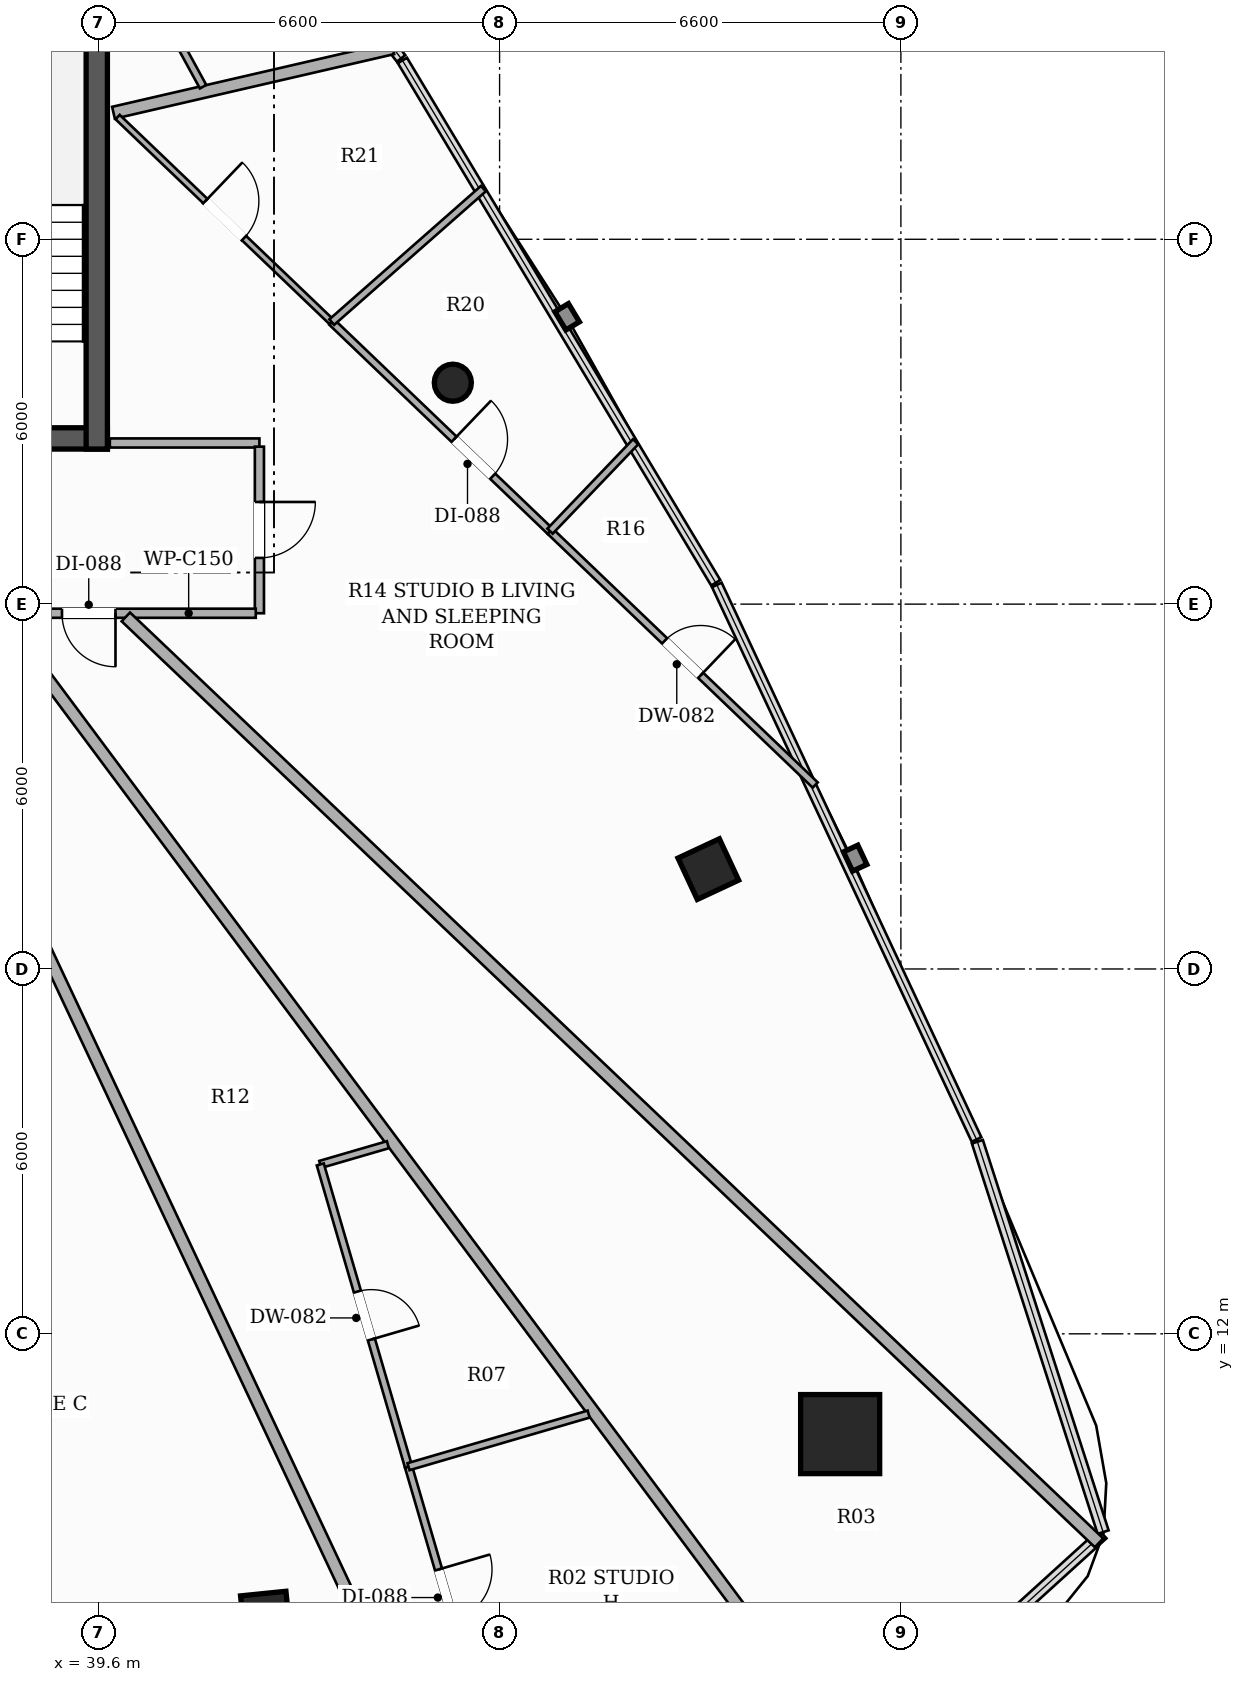
"""IFC4 building model, lengths in metres.
Left out: names, types, materials, properties, quantities, classifications, styles, units other than length and angle.
Written with IfcOpenShell. Run it as: python <this file> out.ifc"""

import sys

from ifc_helpers import new_model, si_unit, direction, frame, frame_2d, origin, origin_2d, place, context, subcontext, project, spatial, rectangle, hollow_rectangle, hollow_circle, extrude, element, fill, save


model = new_model("IFC4")
c1 = context("Model", 3, precision=1e-05, world=origin(), true_north=direction((0.0, 1.0)))
c2 = subcontext(c1, "Body", "Model", "MODEL_VIEW")
j1 = project(units=[si_unit("LENGTHUNIT", "METRE"), si_unit("PLANEANGLEUNIT", "RADIAN")], contexts=[c1])
p1 = place(None, origin())
s1 = spatial("IfcSite", under=j1, at=p1, CompositionType="ELEMENT")
p2 = place(p1, origin())
s2 = spatial("IfcBuilding", under=s1, at=p2, CompositionType="ELEMENT")
p3 = place(p2, frame((0.0, 0.0, 216.2)))
s3 = spatial("IfcBuildingStorey", under=s2, at=p3, CompositionType="ELEMENT", Elevation=216.2)
p4 = place(p3, frame((26.25, 26.725, 0.0), z_axis=(0.0, 0.0, 1.0), x_axis=(1.0, 0.0, 0.0)))
e1 = element("IfcWall", 1, at=p4, inside=s3, PredefinedType="SHEAR", context=c2, shape_type="SweptSolid", body=[
    extrude(rectangle(XDim=13.5, YDim=0.35, at=frame_2d((6.75, 0.0))), origin(), (0.0, 0.0, 1.0), 3.3),
])
p5 = place(p4, frame((4.35, 0.0, 0.0)))
e2 = element("IfcOpeningElement", 2, at=p5, cuts=e1, PredefinedType="OPENING", context=c2, shape_type="SweptSolid", body=[
    extrude(rectangle(XDim=1.05, YDim=2.15, at=frame_2d((0.525, 1.075))), frame((0.0, 0.185, 0.0), z_axis=(0.0, -1.0, 0.0), x_axis=(1.0, 0.0, 0.0)), (0.0, 0.0, 1.0), 0.37),
])
p6 = place(p4, frame((8.3, 0.0, 0.0)))
e3 = element("IfcOpeningElement", 3, at=p6, cuts=e1, PredefinedType="OPENING", context=c2, shape_type="SweptSolid", body=[
    extrude(rectangle(XDim=1.05, YDim=2.15, at=frame_2d((0.525, 1.075))), frame((0.0, 0.185, 0.0), z_axis=(0.0, -1.0, 0.0), x_axis=(1.0, 0.0, 0.0)), (0.0, 0.0, 1.0), 0.37),
])
p7 = place(p3, frame((39.575, 26.55, 0.0), z_axis=(0.0, 0.0, 1.0), x_axis=(0.0, 1.0, 0.0)))
e4 = element("IfcWall", 4, at=p7, inside=s3, PredefinedType="SHEAR", context=c2, shape_type="SweptSolid", body=[
    extrude(rectangle(XDim=7.5, YDim=0.35, at=frame_2d((3.75, 0.0))), origin(), (0.0, 0.0, 1.0), 3.3),
])
p8 = place(p3, frame((51.801, 10.351, 0.0), z_axis=(0.0, 0.0, 1.0), x_axis=(1.0, 0.0, 0.0)))
e5 = element("IfcColumn", 5, at=p8, inside=s3, PredefinedType="COLUMN", context=c2, shape_type="SweptSolid", body=[
    extrude(hollow_rectangle(XDim=1.3, YDim=1.3, WallThickness=0.04, at=origin_2d()), origin(), (0.0, 0.0, 1.0), 3.3),
])
for number, where, z_axis, x_axis in (
    (6, (42.351, 7.355, 0.0), (0.0, 0.0, 1.0), (0.995, 0.101, 0.0)),
    (7, (49.633, 19.642, 0.0), (0.0, 0.0, 1.0), (-0.423, 0.906, 0.0)),
):
    element("IfcColumn", number, at=place(p3, frame(where, z_axis=z_axis, x_axis=x_axis)), inside=s3, PredefinedType="COLUMN", context=c2, shape_type="SweptSolid", body=[
        extrude(hollow_rectangle(XDim=0.75, YDim=0.75, WallThickness=0.025, at=origin_2d()), origin(), (0.0, 0.0, 1.0), 3.3),
    ])
p9 = place(p3, frame((45.431, 27.641, 0.0), z_axis=(0.0, 0.0, 1.0), x_axis=(1.0, 0.0, 0.0)))
e8 = element("IfcColumn", 8, at=p9, inside=s3, PredefinedType="COLUMN", context=c2, shape_type="SweptSolid", body=[
    extrude(hollow_circle(Radius=0.305, WallThickness=0.016, at=origin_2d()), origin(), (0.0, 0.0, 1.0), 3.3),
])
p10 = place(p3, frame((39.79, 26.65, 0.0), z_axis=(0.0, 0.0, 1.0), x_axis=(1.0, 0.0, 0.0)))
e9 = element("IfcWall", 9, at=p10, inside=s3, PredefinedType="PARTITIONING", context=c2, shape_type="SweptSolid", body=[
    extrude(rectangle(XDim=2.46, YDim=0.15, at=frame_2d((1.23, 0.0))), origin(), (0.0, 0.0, 1.0), 2.565),
])
p11 = place(p3, frame((42.25, 26.59, 0.0), z_axis=(0.0, 0.0, 1.0), x_axis=(0.0, -1.0, 0.0)))
e10 = element("IfcWall", 10, at=p11, inside=s3, PredefinedType="PARTITIONING", context=c2, shape_type="SweptSolid", body=[
    extrude(rectangle(XDim=2.74, YDim=0.15, at=frame_2d((1.37, 0.0))), origin(), (0.0, 0.0, 1.0), 2.773),
])
p12 = place(p11, frame((0.91, 0.0, 0.0)))
e11 = element("IfcOpeningElement", 11, at=p12, cuts=e10, PredefinedType="OPENING", context=c2, shape_type="SweptSolid", body=[
    extrude(rectangle(XDim=0.92, YDim=2.15, at=frame_2d((0.46, 1.075))), frame((0.0, 0.085, 0.0), z_axis=(0.0, -1.0, 0.0), x_axis=(1.0, 0.0, 0.0)), (0.0, 0.0, 1.0), 0.17),
])
p13 = place(p3, frame((42.19, 23.85, 0.0), z_axis=(0.0, 0.0, 1.0), x_axis=(-1.0, 0.0, 0.0)))
e12 = element("IfcWall", 12, at=p13, inside=s3, PredefinedType="PARTITIONING", context=c2, shape_type="SweptSolid", body=[
    extrude(rectangle(XDim=8.263, YDim=0.15, at=frame_2d((4.131, 0.0))), origin(), (0.0, 0.0, 1.0), 2.565),
])
p14 = place(p13, frame((6.516, 0.0, 0.0)))
e13 = element("IfcOpeningElement", 13, at=p14, cuts=e12, PredefinedType="OPENING", context=c2, shape_type="SweptSolid", body=[
    extrude(rectangle(XDim=0.88, YDim=2.1, at=frame_2d((0.44, 1.05))), frame((0.0, 0.085, 0.0), z_axis=(0.0, -1.0, 0.0), x_axis=(1.0, 0.0, 0.0)), (0.0, 0.0, 1.0), 0.17),
])
p15 = place(p13, frame((2.307, 0.0, 0.0)))
e14 = element("IfcOpeningElement", 14, at=p15, cuts=e12, PredefinedType="OPENING", context=c2, shape_type="SweptSolid", body=[
    extrude(rectangle(XDim=0.88, YDim=2.1, at=frame_2d((0.44, 1.05))), frame((0.0, 0.085, 0.0), z_axis=(0.0, -1.0, 0.0), x_axis=(1.0, 0.0, 0.0)), (0.0, 0.0, 1.0), 0.17),
])
p16 = place(p13, frame((4.384, 0.0, 0.0)))
e15 = element("IfcOpeningElement", 15, at=p16, cuts=e12, PredefinedType="OPENING", context=c2, shape_type="SweptSolid", body=[
    extrude(rectangle(XDim=0.92, YDim=2.15, at=frame_2d((0.46, 1.075))), frame((0.0, 0.085, 0.0), z_axis=(0.0, -1.0, 0.0), x_axis=(1.0, 0.0, 0.0)), (0.0, 0.0, 1.0), 0.17),
])
p17 = place(p3, frame((39.85, 32.081, 0.0), z_axis=(0.0, 0.0, 1.0), x_axis=(0.974339670333, 0.225082666628, 0.0)))
e16 = element("IfcWall", 16, at=p17, inside=s3, PredefinedType="PARTITIONING", context=c2, shape_type="SweptSolid", body=[
    extrude(rectangle(XDim=4.714, YDim=0.2, at=frame_2d((2.357, 0.0))), origin(), (0.0, 0.0, 1.0), 2.492),
])
p18 = place(p3, frame((56.059, 8.563, 0.0), z_axis=(0.0, 0.0, 1.0), x_axis=(-0.724518891706, 0.689254942355, 0.0)))
e17 = element("IfcWall", 17, at=p18, inside=s3, PredefinedType="PARTITIONING", context=c2, shape_type="SweptSolid", body=[
    extrude(rectangle(XDim=22.092, YDim=0.2, at=frame_2d((11.046, 0.0))), origin(), (0.0, 0.0, 1.0), 2.492),
])
p19 = place(p3, frame((36.155, 23.79, 0.0), z_axis=(0.0, 0.0, 1.0), x_axis=(0.425451226132, -0.90498135571, 0.0)))
e18 = element("IfcWall", 18, at=p19, inside=s3, PredefinedType="PARTITIONING", context=c2, shape_type="SweptSolid", body=[
    extrude(rectangle(XDim=20.266, YDim=0.2, at=frame_2d((10.133, 0.0))), origin(), (0.0, 0.0, 1.0), 2.492),
])
p20 = place(p3, frame((51.072, 6.251, 0.0), z_axis=(0.0, 0.0, 1.0), x_axis=(-0.59756139073, 0.801823162742, 0.0)))
e19 = element("IfcWall", 19, at=p20, inside=s3, PredefinedType="PARTITIONING", context=c2, shape_type="SweptSolid", body=[
    extrude(rectangle(XDim=21.874, YDim=0.2, at=frame_2d((10.937, 0.0))), origin(), (0.0, 0.0, 1.0), 2.492),
])
p21 = place(p3, frame((47.03, 25.2, 0.0), z_axis=(0.0, 0.0, 1.0), x_axis=(0.722345830301, -0.691531995968, 0.0)))
e20 = element("IfcWall", 20, at=p21, inside=s3, PredefinedType="PARTITIONING", context=c2, shape_type="SweptSolid", body=[
    extrude(rectangle(XDim=6.037, YDim=0.12, at=frame_2d((3.019, 0.0))), origin(), (0.0, 0.0, 1.0), 2.492),
])
p22 = place(p21, frame((2.609, 0.0, 0.0)))
e21 = element("IfcOpeningElement", 21, at=p22, cuts=e20, PredefinedType="OPENING", context=c2, shape_type="SweptSolid", body=[
    extrude(rectangle(XDim=0.82, YDim=2.1, at=frame_2d((0.41, 1.05))), frame((0.0, 0.07, 0.0), z_axis=(0.0, -1.0, 0.0), x_axis=(1.0, 0.0, 0.0)), (0.0, 0.0, 1.0), 0.14),
])
p23 = place(p3, frame((43.44, 28.638, 0.0), z_axis=(0.0, 0.0, 1.0), x_axis=(0.722240667523, -0.691641827954, 0.0)))
e22 = element("IfcWall", 22, at=p23, inside=s3, PredefinedType="PARTITIONING", context=c2, shape_type="SweptSolid", body=[
    extrude(rectangle(XDim=4.971, YDim=0.12, at=frame_2d((2.485, 0.0))), origin(), (0.0, 0.0, 1.0), 2.492),
])
p24 = place(p23, frame((2.785, 0.0, 0.0)))
e23 = element("IfcOpeningElement", 23, at=p24, cuts=e22, PredefinedType="OPENING", context=c2, shape_type="SweptSolid", body=[
    extrude(rectangle(XDim=0.88, YDim=2.1, at=frame_2d((0.44, 1.05))), frame((0.0, 0.07, 0.0), z_axis=(0.0, -1.0, 0.0), x_axis=(1.0, 0.0, 0.0)), (0.0, 0.0, 1.0), 0.14),
])
p25 = place(p3, frame((39.918, 32.01, 0.0), z_axis=(0.0, 0.0, 1.0), x_axis=(0.722311203135, -0.691568164266, 0.0)))
e24 = element("IfcWall", 24, at=p25, inside=s3, PredefinedType="PARTITIONING", context=c2, shape_type="SweptSolid", body=[
    extrude(rectangle(XDim=4.876, YDim=0.1, at=frame_2d((2.438, 0.0))), origin(), (0.0, 0.0, 1.0), 2.773),
])
p26 = place(p25, frame((1.998, 0.0, 0.0)))
e25 = element("IfcOpeningElement", 25, at=p26, cuts=e24, PredefinedType="OPENING", context=c2, shape_type="SweptSolid", body=[
    extrude(rectangle(XDim=0.88, YDim=2.1, at=frame_2d((0.44, 1.05))), frame((0.0, 0.06, 0.0), z_axis=(0.0, -1.0, 0.0), x_axis=(1.0, 0.0, 0.0)), (0.0, 0.0, 1.0), 0.12),
])
p27 = place(p3, frame((47.03, 25.2, 0.0), z_axis=(0.0, 0.0, 1.0), x_axis=(0.691459612883, 0.722415118717, 0.0)))
e26 = element("IfcWall", 26, at=p27, inside=s3, PredefinedType="PARTITIONING", context=c2, shape_type="SweptSolid", body=[
    extrude(rectangle(XDim=2.035, YDim=0.12, at=frame_2d((1.018, 0.0))), origin(), (0.0, 0.0, 1.0), 2.492),
])
p28 = place(p3, frame((43.44, 28.638, 0.0), z_axis=(0.0, 0.0, 1.0), x_axis=(0.750679989093, 0.66066599275, 0.0)))
e27 = element("IfcWall", 27, at=p28, inside=s3, PredefinedType="PARTITIONING", context=c2, shape_type="SweptSolid", body=[
    extrude(rectangle(XDim=3.323, YDim=0.12, at=frame_2d((1.661, 0.0))), origin(), (0.0, 0.0, 1.0), 2.492),
])
p29 = place(p3, frame((38.357, 37.934, 0.0), z_axis=(0.0, 0.0, 1.0), x_axis=(0.479839410825, -0.877356335715, 0.0)))
e28 = element("IfcWall", 28, at=p29, inside=s3, PredefinedType="PARTITIONING", context=c2, shape_type="SweptSolid", body=[
    extrude(rectangle(XDim=6.183, YDim=0.12, at=frame_2d((3.092, 0.0))), origin(), (0.0, 0.0, 1.0), 2.492),
])
p30 = place(p3, frame((44.363, 15.11, 0.0), z_axis=(0.0, 0.0, 1.0), x_axis=(-0.960030681494, -0.279894784857, 0.0)))
e29 = element("IfcWall", 29, at=p30, inside=s3, PredefinedType="PARTITIONING", context=c2, shape_type="SweptSolid", body=[
    extrude(rectangle(XDim=1.158, YDim=0.12, at=frame_2d((0.579, 0.0))), origin(), (0.0, 0.0, 1.0), 2.773),
])
p31 = place(p3, frame((43.251, 14.786, 0.0), z_axis=(0.0, 0.0, 1.0), x_axis=(0.280190088139, -0.959944537204, 0.0)))
e30 = element("IfcWall", 30, at=p31, inside=s3, PredefinedType="PARTITIONING", context=c2, shape_type="SweptSolid", body=[
    extrude(rectangle(XDim=5.178, YDim=0.12, at=frame_2d((2.589, 0.0))), origin(), (0.0, 0.0, 1.0), 3.06),
])
p32 = place(p31, frame((2.179, 0.0, 0.0)))
e31 = element("IfcOpeningElement", 31, at=p32, cuts=e30, PredefinedType="OPENING", context=c2, shape_type="SweptSolid", body=[
    extrude(rectangle(XDim=0.82, YDim=2.1, at=frame_2d((0.41, 1.05))), frame((0.0, 0.07, 0.0), z_axis=(0.0, -1.0, 0.0), x_axis=(1.0, 0.0, 0.0)), (0.0, 0.0, 1.0), 0.14),
])
p33 = place(p3, frame((44.702, 9.815, 0.0), z_axis=(0.0, 0.0, 1.0), x_axis=(0.28033432121, -0.959902426474, 0.0)))
e32 = element("IfcWall", 32, at=p33, inside=s3, PredefinedType="PARTITIONING", context=c2, shape_type="SweptSolid", body=[
    extrude(rectangle(XDim=4.402, YDim=0.12, at=frame_2d((2.201, 0.0))), origin(), (0.0, 0.0, 1.0), 2.492),
])
p34 = place(p33, frame((1.761, 0.0, 0.0)))
e33 = element("IfcOpeningElement", 33, at=p34, cuts=e32, PredefinedType="OPENING", context=c2, shape_type="SweptSolid", body=[
    extrude(rectangle(XDim=0.88, YDim=2.1, at=frame_2d((0.44, 1.05))), frame((0.0, 0.07, 0.0), z_axis=(0.0, -1.0, 0.0), x_axis=(1.0, 0.0, 0.0)), (0.0, 0.0, 1.0), 0.14),
])
p35 = place(p3, frame((47.665, 10.68, 0.0), z_axis=(0.0, 0.0, 1.0), x_axis=(-0.959935309068, -0.280221702235, 0.0)))
e34 = element("IfcWall", 34, at=p35, inside=s3, PredefinedType="PARTITIONING", context=c2, shape_type="SweptSolid", body=[
    extrude(rectangle(XDim=3.087, YDim=0.12, at=frame_2d((1.543, 0.0))), origin(), (0.0, 0.0, 1.0), 2.773),
])
p36 = place(p12, origin())
e35 = element("IfcDoor", 35, at=p36, inside=s3, OperationType="SINGLE_SWING_LEFT", PredefinedType="DOOR", context=c2, shape_type="SweptSolid", body=[
    extrude(rectangle(XDim=0.92, YDim=2.15, at=frame_2d((0.46, 1.075))), frame((0.0, 0.025, 0.0), z_axis=(0.0, -1.0, 0.0), x_axis=(1.0, 0.0, 0.0)), (0.0, 0.0, 1.0), 0.05),
])
fill(e11, e35)
p37 = place(p22, origin())
e36 = element("IfcDoor", 36, at=p37, inside=s3, OperationType="SINGLE_SWING_RIGHT", PredefinedType="DOOR", context=c2, shape_type="SweptSolid", body=[
    extrude(rectangle(XDim=0.82, YDim=2.1, at=frame_2d((0.41, 1.05))), frame((0.0, 0.025, 0.0), z_axis=(0.0, -1.0, 0.0), x_axis=(1.0, 0.0, 0.0)), (0.0, 0.0, 1.0), 0.05),
])
fill(e21, e36)
p38 = place(p24, origin())
e37 = element("IfcDoor", 37, at=p38, inside=s3, OperationType="SINGLE_SWING_LEFT", PredefinedType="DOOR", context=c2, shape_type="SweptSolid", body=[
    extrude(rectangle(XDim=0.88, YDim=2.1, at=frame_2d((0.44, 1.05))), frame((0.0, 0.025, 0.0), z_axis=(0.0, -1.0, 0.0), x_axis=(1.0, 0.0, 0.0)), (0.0, 0.0, 1.0), 0.05),
])
fill(e23, e37)
p39 = place(p26, origin())
e38 = element("IfcDoor", 38, at=p39, inside=s3, OperationType="SINGLE_SWING_LEFT", PredefinedType="DOOR", context=c2, shape_type="SweptSolid", body=[
    extrude(rectangle(XDim=0.88, YDim=2.1, at=frame_2d((0.44, 1.05))), frame((0.0, 0.025, 0.0), z_axis=(0.0, -1.0, 0.0), x_axis=(1.0, 0.0, 0.0)), (0.0, 0.0, 1.0), 0.05),
])
fill(e25, e38)
p40 = place(p15, origin())
e39 = element("IfcDoor", 39, at=p40, inside=s3, OperationType="SINGLE_SWING_LEFT", PredefinedType="DOOR", context=c2, shape_type="SweptSolid", body=[
    extrude(rectangle(XDim=0.88, YDim=2.1, at=frame_2d((0.44, 1.05))), frame((0.0, 0.025, 0.0), z_axis=(0.0, -1.0, 0.0), x_axis=(1.0, 0.0, 0.0)), (0.0, 0.0, 1.0), 0.05),
])
fill(e14, e39)
p41 = place(p32, origin())
e40 = element("IfcDoor", 40, at=p41, inside=s3, OperationType="SINGLE_SWING_RIGHT", PredefinedType="DOOR", context=c2, shape_type="SweptSolid", body=[
    extrude(rectangle(XDim=0.82, YDim=2.1, at=frame_2d((0.41, 1.05))), frame((0.0, 0.025, 0.0), z_axis=(0.0, -1.0, 0.0), x_axis=(1.0, 0.0, 0.0)), (0.0, 0.0, 1.0), 0.05),
])
fill(e31, e40)
p42 = place(p34, origin())
e41 = element("IfcDoor", 41, at=p42, inside=s3, OperationType="SINGLE_SWING_LEFT", PredefinedType="DOOR", context=c2, shape_type="SweptSolid", body=[
    extrude(rectangle(XDim=0.88, YDim=2.1, at=frame_2d((0.44, 1.05))), frame((0.0, 0.025, 0.0), z_axis=(0.0, -1.0, 0.0), x_axis=(1.0, 0.0, 0.0)), (0.0, 0.0, 1.0), 0.05),
])
fill(e33, e41)
save(model, sys.argv[1])
